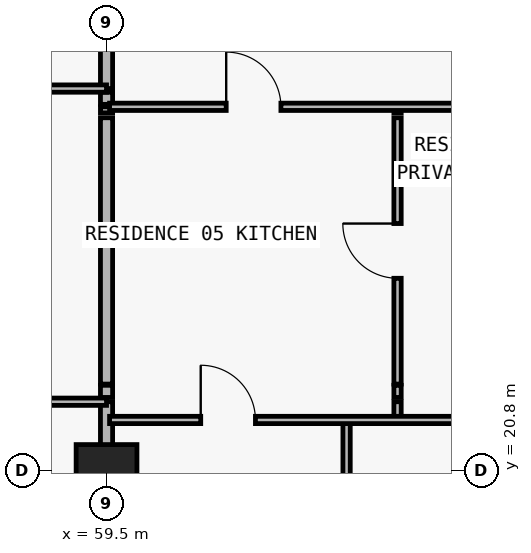
"""IFC4 building model, lengths in metres.
Left out: names, types, materials, properties, quantities, classifications, styles, units other than length and angle.
Written with IfcOpenShell. Run it as: python <this file> out.ifc"""

import sys

from ifc_helpers import new_model, si_unit, direction, frame, frame_2d, origin, origin_2d, place, context, subcontext, project, spatial, rectangle, extrude, element, fill, save


model = new_model("IFC4")
c1 = context("Model", 3, precision=1e-05, world=origin(), true_north=direction((0.0, 1.0)))
c2 = subcontext(c1, "Body", "Model", "MODEL_VIEW")
j1 = project(units=[si_unit("LENGTHUNIT", "METRE"), si_unit("PLANEANGLEUNIT", "RADIAN")], contexts=[c1])
p1 = place(None, origin())
s1 = spatial("IfcSite", under=j1, at=p1, CompositionType="ELEMENT")
p2 = place(p1, origin())
s2 = spatial("IfcBuilding", under=s1, at=p2, CompositionType="ELEMENT")
p3 = place(p2, frame((0.0, 0.0, 119.1)))
s3 = spatial("IfcBuildingStorey", under=s2, at=p3, CompositionType="ELEMENT", Elevation=119.1)
p4 = place(p3, frame((59.5, 20.8, 0.0), z_axis=(0.0, 0.0, 1.0), x_axis=(1.0, 0.0, 0.0)))
e1 = element("IfcColumn", 1, at=p4, inside=s3, PredefinedType="COLUMN", context=c2, shape_type="SweptSolid", body=[
    extrude(rectangle(XDim=1.0, YDim=0.85, at=origin_2d()), origin(), (0.0, 0.0, 1.0), 3.05),
])
p5 = place(p3, frame((59.5, 8.84, 0.0), z_axis=(0.0, 0.0, 1.0), x_axis=(0.0, 1.0, 0.0)))
e2 = element("IfcWall", 2, at=p5, inside=s3, PredefinedType="PARTITIONING", context=c2, shape_type="SweptSolid", body=[
    extrude(rectangle(XDim=13.09, YDim=0.2, at=frame_2d((6.545, 0.0))), origin(), (0.0, 0.0, 1.0), 2.174),
])
p6 = place(p3, frame((59.5, 22.0, 0.0), z_axis=(0.0, 0.0, 1.0), x_axis=(0.0, 1.0, 0.0)))
e3 = element("IfcWall", 3, at=p6, inside=s3, PredefinedType="PARTITIONING", context=c2, shape_type="SweptSolid", body=[
    extrude(rectangle(XDim=0.2, YDim=0.2, at=frame_2d((0.1, 0.0))), origin(), (0.0, 0.0, 1.0), 2.174),
])
p7 = place(p3, frame((59.5, 22.22, 0.0), z_axis=(0.0, 0.0, 1.0), x_axis=(0.0, 1.0, 0.0)))
e4 = element("IfcWall", 4, at=p7, inside=s3, PredefinedType="PARTITIONING", context=c2, shape_type="SweptSolid", body=[
    extrude(rectangle(XDim=4.38, YDim=0.2, at=frame_2d((2.19, 0.0))), origin(), (0.0, 0.0, 1.0), 2.174),
])
p8 = place(p3, frame((59.5, 26.68, 0.0), z_axis=(0.0, 0.0, 1.0), x_axis=(0.0, 1.0, 0.0)))
e5 = element("IfcWall", 5, at=p8, inside=s3, PredefinedType="PARTITIONING", context=c2, shape_type="SweptSolid", body=[
    extrude(rectangle(XDim=0.1, YDim=0.2, at=frame_2d((0.05, 0.0))), origin(), (0.0, 0.0, 1.0), 2.174),
])
p9 = place(p3, frame((59.5, 26.82, 0.0), z_axis=(0.0, 0.0, 1.0), x_axis=(0.0, 1.0, 0.0)))
e6 = element("IfcWall", 6, at=p9, inside=s3, PredefinedType="PARTITIONING", context=c2, shape_type="SweptSolid", body=[
    extrude(rectangle(XDim=0.2, YDim=0.2, at=frame_2d((0.1, 0.0))), origin(), (0.0, 0.0, 1.0), 2.174),
])
p10 = place(p3, frame((59.5, 27.08, 0.0), z_axis=(0.0, 0.0, 1.0), x_axis=(0.0, 1.0, 0.0)))
e7 = element("IfcWall", 7, at=p10, inside=s3, PredefinedType="PARTITIONING", context=c2, shape_type="SweptSolid", body=[
    extrude(rectangle(XDim=6.52, YDim=0.2, at=frame_2d((3.26, 0.0))), origin(), (0.0, 0.0, 1.0), 2.174),
])
p11 = place(p3, frame((63.448, 8.84, 0.0), z_axis=(0.0, 0.0, 1.0), x_axis=(0.0, 1.0, 0.0)))
e8 = element("IfcWall", 8, at=p11, inside=s3, PredefinedType="PARTITIONING", context=c2, shape_type="SweptSolid", body=[
    extrude(rectangle(XDim=12.79, YDim=0.12, at=frame_2d((6.395, 0.0))), origin(), (0.0, 0.0, 1.0), 3.05),
])
p12 = place(p3, frame((64.286, 21.63, 0.0), z_axis=(0.0, 0.0, 1.0), x_axis=(0.0, 1.0, 0.0)))
e9 = element("IfcWall", 9, at=p12, inside=s3, PredefinedType="PARTITIONING", context=c2, shape_type="SweptSolid", body=[
    extrude(rectangle(XDim=0.3, YDim=0.12, at=frame_2d((0.15, 0.0))), origin(), (0.0, 0.0, 1.0), 3.05),
])
p13 = place(p3, frame((64.286, 22.0, 0.0), z_axis=(0.0, 0.0, 1.0), x_axis=(0.0, 1.0, 0.0)))
e10 = element("IfcWall", 10, at=p13, inside=s3, PredefinedType="PARTITIONING", context=c2, shape_type="SweptSolid", body=[
    extrude(rectangle(XDim=0.2, YDim=0.12, at=frame_2d((0.1, 0.0))), origin(), (0.0, 0.0, 1.0), 3.05),
])
p14 = place(p3, frame((64.286, 22.22, 0.0), z_axis=(0.0, 0.0, 1.0), x_axis=(0.0, 1.0, 0.0)))
e11 = element("IfcWall", 11, at=p14, inside=s3, PredefinedType="PARTITIONING", context=c2, shape_type="SweptSolid", body=[
    extrude(rectangle(XDim=4.38, YDim=0.12, at=frame_2d((2.19, 0.0))), origin(), (0.0, 0.0, 1.0), 3.05),
])
p15 = place(p14, frame((1.74, 0.0, 0.0)))
e12 = element("IfcOpeningElement", 12, at=p15, cuts=e11, PredefinedType="OPENING", context=c2, shape_type="SweptSolid", body=[
    extrude(rectangle(XDim=0.9, YDim=2.15, at=frame_2d((0.45, 1.075))), frame((0.0, 0.07, 0.0), z_axis=(0.0, -1.0, 0.0), x_axis=(1.0, 0.0, 0.0)), (0.0, 0.0, 1.0), 0.14),
])
p16 = place(p3, frame((64.286, 26.68, 0.0), z_axis=(0.0, 0.0, 1.0), x_axis=(0.0, 1.0, 0.0)))
e13 = element("IfcWall", 13, at=p16, inside=s3, PredefinedType="PARTITIONING", context=c2, shape_type="SweptSolid", body=[
    extrude(rectangle(XDim=0.1, YDim=0.12, at=frame_2d((0.05, 0.0))), origin(), (0.0, 0.0, 1.0), 3.05),
])
p17 = place(p3, frame((59.55, 21.63, 0.0), z_axis=(0.0, 0.0, 1.0), x_axis=(1.0, 0.0, 0.0)))
e14 = element("IfcWall", 14, at=p17, inside=s3, PredefinedType="PARTITIONING", context=c2, shape_type="SweptSolid", body=[
    extrude(rectangle(XDim=8.35, YDim=0.12, at=frame_2d((4.175, 0.0))), origin(), (0.0, 0.0, 1.0), 3.05),
])
p18 = place(p17, frame((1.499, 0.0, 0.0)))
e15 = element("IfcOpeningElement", 15, at=p18, cuts=e14, PredefinedType="OPENING", context=c2, shape_type="SweptSolid", body=[
    extrude(rectangle(XDim=0.9, YDim=2.15, at=frame_2d((0.45, 1.075))), frame((0.0, 0.07, 0.0), z_axis=(0.0, -1.0, 0.0), x_axis=(1.0, 0.0, 0.0)), (0.0, 0.0, 1.0), 0.14),
])
p19 = place(p17, frame((6.093, 0.0, 0.0)))
e16 = element("IfcOpeningElement", 16, at=p19, cuts=e14, PredefinedType="OPENING", context=c2, shape_type="SweptSolid", body=[
    extrude(rectangle(XDim=0.9, YDim=2.15, at=frame_2d((0.45, 1.075))), frame((0.0, 0.07, 0.0), z_axis=(0.0, -1.0, 0.0), x_axis=(1.0, 0.0, 0.0)), (0.0, 0.0, 1.0), 0.14),
])
p20 = place(p3, frame((51.32, 21.93, 0.0), z_axis=(0.0, 0.0, 1.0), x_axis=(1.0, 0.0, 0.0)))
e17 = element("IfcWall", 17, at=p20, inside=s3, PredefinedType="PARTITIONING", context=c2, shape_type="SweptSolid", body=[
    extrude(rectangle(XDim=8.18, YDim=0.12, at=frame_2d((4.09, 0.0))), origin(), (0.0, 0.0, 1.0), 3.05),
])
p21 = place(p20, frame((1.708, 0.0, 0.0)))
e18 = element("IfcOpeningElement", 18, at=p21, cuts=e17, PredefinedType="OPENING", context=c2, shape_type="SweptSolid", body=[
    extrude(rectangle(XDim=0.9, YDim=2.15, at=frame_2d((0.45, 1.075))), frame((0.0, 0.07, 0.0), z_axis=(0.0, -1.0, 0.0), x_axis=(1.0, 0.0, 0.0)), (0.0, 0.0, 1.0), 0.14),
])
p22 = place(p20, frame((5.84, 0.0, 0.0)))
e19 = element("IfcOpeningElement", 19, at=p22, cuts=e17, PredefinedType="OPENING", context=c2, shape_type="SweptSolid", body=[
    extrude(rectangle(XDim=0.9, YDim=2.15, at=frame_2d((0.45, 1.075))), frame((0.0, 0.07, 0.0), z_axis=(0.0, -1.0, 0.0), x_axis=(1.0, 0.0, 0.0)), (0.0, 0.0, 1.0), 0.14),
])
p23 = place(p3, frame((59.55, 26.78, 0.0), z_axis=(0.0, 0.0, 1.0), x_axis=(1.0, 0.0, 0.0)))
e20 = element("IfcWall", 20, at=p23, inside=s3, PredefinedType="PARTITIONING", context=c2, shape_type="SweptSolid", body=[
    extrude(rectangle(XDim=8.35, YDim=0.12, at=frame_2d((4.175, 0.0))), origin(), (0.0, 0.0, 1.0), 3.05),
])
p24 = place(p23, frame((1.918, 0.0, 0.0)))
e21 = element("IfcOpeningElement", 21, at=p24, cuts=e20, PredefinedType="OPENING", context=c2, shape_type="SweptSolid", body=[
    extrude(rectangle(XDim=0.9, YDim=2.15, at=frame_2d((0.45, 1.075))), frame((0.0, 0.07, 0.0), z_axis=(0.0, -1.0, 0.0), x_axis=(1.0, 0.0, 0.0)), (0.0, 0.0, 1.0), 0.14),
])
p25 = place(p3, frame((51.32, 27.08, 0.0), z_axis=(0.0, 0.0, 1.0), x_axis=(1.0, 0.0, 0.0)))
e22 = element("IfcWall", 22, at=p25, inside=s3, PredefinedType="PARTITIONING", context=c2, shape_type="SweptSolid", body=[
    extrude(rectangle(XDim=8.18, YDim=0.12, at=frame_2d((4.09, 0.0))), origin(), (0.0, 0.0, 1.0), 3.05),
])
p26 = place(p25, frame((1.708, 0.0, 0.0)))
e23 = element("IfcOpeningElement", 23, at=p26, cuts=e22, PredefinedType="OPENING", context=c2, shape_type="SweptSolid", body=[
    extrude(rectangle(XDim=0.9, YDim=2.15, at=frame_2d((0.45, 1.075))), frame((0.0, 0.07, 0.0), z_axis=(0.0, -1.0, 0.0), x_axis=(1.0, 0.0, 0.0)), (0.0, 0.0, 1.0), 0.14),
])
p27 = place(p24, origin())
e24 = element("IfcDoor", 24, at=p27, inside=s3, OperationType="SINGLE_SWING_LEFT", PredefinedType="DOOR", context=c2, shape_type="SweptSolid", body=[
    extrude(rectangle(XDim=0.9, YDim=2.15, at=frame_2d((0.45, 1.075))), frame((0.0, 0.025, 0.0), z_axis=(0.0, -1.0, 0.0), x_axis=(1.0, 0.0, 0.0)), (0.0, 0.0, 1.0), 0.05),
])
fill(e21, e24)
p28 = place(p15, origin())
e25 = element("IfcDoor", 25, at=p28, inside=s3, OperationType="SINGLE_SWING_RIGHT", PredefinedType="DOOR", context=c2, shape_type="SweptSolid", body=[
    extrude(rectangle(XDim=0.9, YDim=2.15, at=frame_2d((0.45, 1.075))), frame((0.0, 0.025, 0.0), z_axis=(0.0, -1.0, 0.0), x_axis=(1.0, 0.0, 0.0)), (0.0, 0.0, 1.0), 0.05),
])
fill(e12, e25)
p29 = place(p18, origin())
e26 = element("IfcDoor", 26, at=p29, inside=s3, OperationType="SINGLE_SWING_LEFT", PredefinedType="DOOR", context=c2, shape_type="SweptSolid", body=[
    extrude(rectangle(XDim=0.9, YDim=2.15, at=frame_2d((0.45, 1.075))), frame((0.0, 0.025, 0.0), z_axis=(0.0, -1.0, 0.0), x_axis=(1.0, 0.0, 0.0)), (0.0, 0.0, 1.0), 0.05),
])
fill(e15, e26)
save(model, sys.argv[1])
